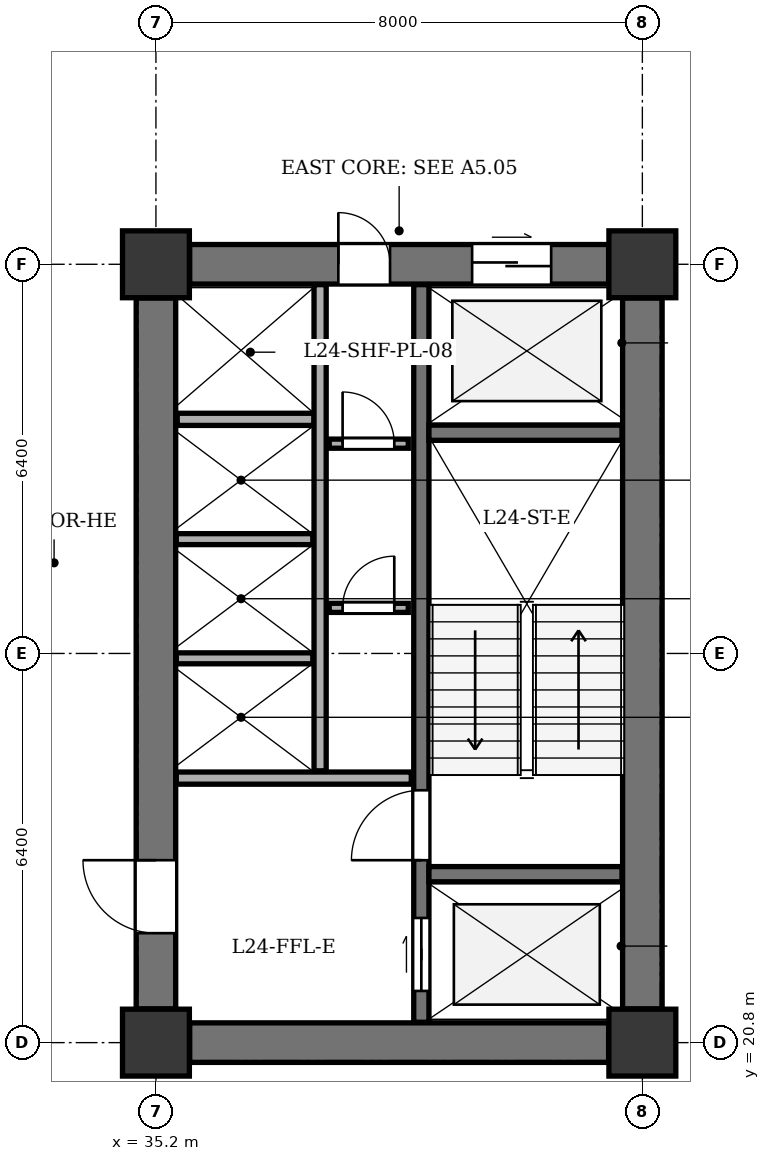
"""IFC4 building model, lengths in metres.
Left out: names, types, materials, properties, quantities, classifications, styles, units other than length and angle.
Written with IfcOpenShell. Run it as: python <this file> out.ifc"""

import sys

from ifc_helpers import new_model, si_unit, direction, frame, frame_2d, origin, origin_2d, place, context, subcontext, project, spatial, rectangle, extrude, element, fill, save


model = new_model("IFC4")
c1 = context("Model", 3, precision=1e-05, world=origin(), true_north=direction((0.0, 1.0)))
c2 = subcontext(c1, "Body", "Model", "MODEL_VIEW")
j1 = project(units=[si_unit("LENGTHUNIT", "METRE"), si_unit("PLANEANGLEUNIT", "RADIAN")], contexts=[c1])
p1 = place(None, origin())
s1 = spatial("IfcSite", under=j1, at=p1, CompositionType="ELEMENT")
p2 = place(p1, origin())
s2 = spatial("IfcBuilding", under=s1, at=p2, CompositionType="ELEMENT")
p3 = place(p2, frame((0.0, 0.0, 98.4)))
s3 = spatial("IfcBuildingStorey", under=s2, at=p3, CompositionType="ELEMENT", Elevation=98.4)
for number, where, z_axis, x_axis in (
    (1, (35.2, 20.8, 0.0), (0.0, 0.0, 1.0), (1.0, 0.0, 0.0)),
    (2, (43.2, 20.8, 0.0), (0.0, 0.0, 1.0), (1.0, 0.0, 0.0)),
    (3, (35.2, 33.6, 0.0), (0.0, 0.0, 1.0), (1.0, 0.0, 0.0)),
    (4, (43.2, 33.6, 0.0), (0.0, 0.0, 1.0), (1.0, 0.0, 0.0)),
):
    element("IfcColumn", number, at=place(p3, frame(where, z_axis=z_axis, x_axis=x_axis)), inside=s3, PredefinedType="COLUMN", context=c2, shape_type="SweptSolid", body=[
        extrude(rectangle(XDim=1.1, YDim=1.1, at=origin_2d()), origin(), (0.0, 0.0, 1.0), 3.9),
    ])
p4 = place(p3, frame((43.2, 21.355, 0.0), z_axis=(0.0, 0.0, 1.0), x_axis=(0.0, 1.0, 0.0)))
e5 = element("IfcWall", 5, at=p4, inside=s3, PredefinedType="SHEAR", context=c2, shape_type="SweptSolid", body=[
    extrude(rectangle(XDim=11.69, YDim=0.65, at=frame_2d((5.845, 0.0))), origin(), (0.0, 0.0, 1.0), 3.6),
])
p5 = place(p3, frame((35.755, 20.8, 0.0), z_axis=(0.0, 0.0, 1.0), x_axis=(1.0, 0.0, 0.0)))
e6 = element("IfcWall", 6, at=p5, inside=s3, PredefinedType="SHEAR", context=c2, shape_type="SweptSolid", body=[
    extrude(rectangle(XDim=6.89, YDim=0.65, at=frame_2d((3.445, 0.0))), origin(), (0.0, 0.0, 1.0), 3.6),
])
p6 = place(p3, frame((35.755, 33.6, 0.0), z_axis=(0.0, 0.0, 1.0), x_axis=(1.0, 0.0, 0.0)))
e7 = element("IfcWall", 7, at=p6, inside=s3, PredefinedType="SHEAR", context=c2, shape_type="SweptSolid", body=[
    extrude(rectangle(XDim=6.89, YDim=0.65, at=frame_2d((3.445, 0.0))), origin(), (0.0, 0.0, 1.0), 3.6),
])
p7 = place(p6, frame((4.645, 0.0, 0.0)))
e8 = element("IfcOpeningElement", 8, at=p7, cuts=e7, PredefinedType="OPENING", context=c2, shape_type="SweptSolid", body=[
    extrude(rectangle(XDim=1.3, YDim=2.15, at=frame_2d((0.65, 1.075))), frame((0.0, 0.335, 0.0), z_axis=(0.0, -1.0, 0.0), x_axis=(1.0, 0.0, 0.0)), (0.0, 0.0, 1.0), 0.67),
])
p8 = place(p6, frame((2.445, 0.0, 0.0)))
e9 = element("IfcOpeningElement", 9, at=p8, cuts=e7, PredefinedType="OPENING", context=c2, shape_type="SweptSolid", body=[
    extrude(rectangle(XDim=0.85, YDim=2.02, at=frame_2d((0.425, 1.01))), frame((0.0, 0.335, 0.0), z_axis=(0.0, -1.0, 0.0), x_axis=(1.0, 0.0, 0.0)), (0.0, 0.0, 1.0), 0.67),
])
p9 = place(p3, frame((35.2, 21.355, 0.0), z_axis=(0.0, 0.0, 1.0), x_axis=(0.0, 1.0, 0.0)))
e10 = element("IfcWall", 10, at=p9, inside=s3, PredefinedType="SHEAR", context=c2, shape_type="SweptSolid", body=[
    extrude(rectangle(XDim=11.69, YDim=0.65, at=frame_2d((5.845, 0.0))), origin(), (0.0, 0.0, 1.0), 3.6),
])
p10 = place(p9, frame((1.245, 0.0, 0.0)))
e11 = element("IfcOpeningElement", 11, at=p10, cuts=e10, PredefinedType="OPENING", context=c2, shape_type="SweptSolid", body=[
    extrude(rectangle(XDim=1.2, YDim=2.15, at=frame_2d((0.6, 1.075))), frame((0.0, 0.335, 0.0), z_axis=(0.0, -1.0, 0.0), x_axis=(1.0, 0.0, 0.0)), (0.0, 0.0, 1.0), 0.67),
])
p11 = place(p3, frame((39.565, 21.135, 0.0), z_axis=(0.0, 0.0, 1.0), x_axis=(0.0, 1.0, 0.0)))
e12 = element("IfcWall", 12, at=p11, inside=s3, PredefinedType="SHEAR", context=c2, shape_type="SweptSolid", body=[
    extrude(rectangle(XDim=12.13, YDim=0.25, at=frame_2d((6.065, 0.0))), origin(), (0.0, 0.0, 1.0), 3.6),
])
p12 = place(p11, frame((0.515, 0.0, 0.0)))
e13 = element("IfcOpeningElement", 13, at=p12, cuts=e12, PredefinedType="OPENING", context=c2, shape_type="SweptSolid", body=[
    extrude(rectangle(XDim=1.2, YDim=2.15, at=frame_2d((0.6, 1.075))), frame((0.0, 0.135, 0.0), z_axis=(0.0, -1.0, 0.0), x_axis=(1.0, 0.0, 0.0)), (0.0, 0.0, 1.0), 0.27),
])
p13 = place(p11, frame((2.665, 0.0, 0.0)))
e14 = element("IfcOpeningElement", 14, at=p13, cuts=e12, PredefinedType="OPENING", context=c2, shape_type="SweptSolid", body=[
    extrude(rectangle(XDim=1.15, YDim=2.15, at=frame_2d((0.575, 1.075))), frame((0.0, 0.135, 0.0), z_axis=(0.0, -1.0, 0.0), x_axis=(1.0, 0.0, 0.0)), (0.0, 0.0, 1.0), 0.27),
])
for number, where, z_axis, x_axis in (
    (15, (39.69, 23.57, 0.0), (0.0, 0.0, 1.0), (1.0, 0.0, 0.0)),
    (16, (39.69, 30.83, 0.0), (0.0, 0.0, 1.0), (1.0, 0.0, 0.0)),
):
    element("IfcWall", number, at=place(p3, frame(where, z_axis=z_axis, x_axis=x_axis)), inside=s3, PredefinedType="SHEAR", context=c2, shape_type="SweptSolid", body=[
        extrude(rectangle(XDim=3.175, YDim=0.25, at=frame_2d((1.587, 0.0))), origin(), (0.0, 0.0, 1.0), 3.6),
    ])
p14 = place(p3, frame((35.535, 25.15, 0.0), z_axis=(0.0, 0.0, 1.0), x_axis=(1.0, 0.0, 0.0)))
e17 = element("IfcWall", 17, at=p14, inside=s3, PredefinedType="SOLIDWALL", context=c2, shape_type="SweptSolid", body=[
    extrude(rectangle(XDim=3.865, YDim=0.2, at=frame_2d((1.933, 0.0))), origin(), (0.0, 0.0, 1.0), 3.6),
])
p15 = place(p3, frame((35.55, 31.05, 0.0), z_axis=(0.0, 0.0, 1.0), x_axis=(1.0, 0.0, 0.0)))
e18 = element("IfcWall", 18, at=p15, inside=s3, PredefinedType="SOLIDWALL", context=c2, shape_type="SweptSolid", body=[
    extrude(rectangle(XDim=2.25, YDim=0.2, at=frame_2d((1.125, 0.0))), origin(), (0.0, 0.0, 1.0), 3.6),
])
p16 = place(p3, frame((37.9, 25.27, 0.0), z_axis=(0.0, 0.0, 1.0), x_axis=(0.0, 1.0, 0.0)))
e19 = element("IfcWall", 19, at=p16, inside=s3, PredefinedType="SOLIDWALL", context=c2, shape_type="SweptSolid", body=[
    extrude(rectangle(XDim=7.995, YDim=0.2, at=frame_2d((3.998, 0.0))), origin(), (0.0, 0.0, 1.0), 3.6),
])
for number, where, z_axis, x_axis in (
    (20, (35.535, 27.12, 0.0), (0.0, 0.0, 1.0), (1.0, 0.0, 0.0)),
    (21, (35.535, 29.08, 0.0), (0.0, 0.0, 1.0), (1.0, 0.0, 0.0)),
):
    element("IfcWall", number, at=place(p3, frame(where, z_axis=z_axis, x_axis=x_axis)), inside=s3, PredefinedType="PARTITIONING", context=c2, shape_type="SweptSolid", body=[
        extrude(rectangle(XDim=2.245, YDim=0.18, at=frame_2d((1.123, 0.0))), origin(), (0.0, 0.0, 1.0), 3.6),
    ])
p17 = place(p3, frame((38.05, 27.95, 0.0), z_axis=(0.0, 0.0, 1.0), x_axis=(1.0, 0.0, 0.0)))
e22 = element("IfcWall", 22, at=p17, inside=s3, PredefinedType="PARTITIONING", context=c2, shape_type="SweptSolid", body=[
    extrude(rectangle(XDim=1.3, YDim=0.15, at=frame_2d((0.65, 0.0))), origin(), (0.0, 0.0, 1.0), 3.6),
])
p18 = place(p17, frame((0.22, 0.0, 0.0)))
e23 = element("IfcOpeningElement", 23, at=p18, cuts=e22, PredefinedType="OPENING", context=c2, shape_type="SweptSolid", body=[
    extrude(rectangle(XDim=0.85, YDim=2.02, at=frame_2d((0.425, 1.01))), frame((0.0, 0.085, 0.0), z_axis=(0.0, -1.0, 0.0), x_axis=(1.0, 0.0, 0.0)), (0.0, 0.0, 1.0), 0.17),
])
p19 = place(p3, frame((38.05, 30.65, 0.0), z_axis=(0.0, 0.0, 1.0), x_axis=(1.0, 0.0, 0.0)))
e24 = element("IfcWall", 24, at=p19, inside=s3, PredefinedType="PARTITIONING", context=c2, shape_type="SweptSolid", body=[
    extrude(rectangle(XDim=1.3, YDim=0.15, at=frame_2d((0.65, 0.0))), origin(), (0.0, 0.0, 1.0), 3.6),
])
p20 = place(p19, frame((0.22, 0.0, 0.0)))
e25 = element("IfcOpeningElement", 25, at=p20, cuts=e24, PredefinedType="OPENING", context=c2, shape_type="SweptSolid", body=[
    extrude(rectangle(XDim=0.85, YDim=2.02, at=frame_2d((0.425, 1.01))), frame((0.0, 0.085, 0.0), z_axis=(0.0, -1.0, 0.0), x_axis=(1.0, 0.0, 0.0)), (0.0, 0.0, 1.0), 0.17),
])
p21 = place(p7, origin())
e26 = element("IfcDoor", 26, at=p21, inside=s3, OperationType="DOUBLE_DOOR_SLIDING", PredefinedType="DOOR", context=c2, shape_type="SweptSolid", body=[
    extrude(rectangle(XDim=1.3, YDim=2.15, at=frame_2d((0.65, 1.075))), frame((0.0, 0.025, 0.0), z_axis=(0.0, -1.0, 0.0), x_axis=(1.0, 0.0, 0.0)), (0.0, 0.0, 1.0), 0.05),
])
fill(e8, e26)
p22 = place(p8, origin())
e27 = element("IfcDoor", 27, at=p22, inside=s3, OperationType="SINGLE_SWING_LEFT", PredefinedType="DOOR", context=c2, shape_type="SweptSolid", body=[
    extrude(rectangle(XDim=0.85, YDim=2.02, at=frame_2d((0.425, 1.01))), frame((0.0, 0.025, 0.0), z_axis=(0.0, -1.0, 0.0), x_axis=(1.0, 0.0, 0.0)), (0.0, 0.0, 1.0), 0.05),
])
fill(e9, e27)
p23 = place(p10, origin())
e28 = element("IfcDoor", 28, at=p23, inside=s3, OperationType="SINGLE_SWING_RIGHT", PredefinedType="DOOR", context=c2, shape_type="SweptSolid", body=[
    extrude(rectangle(XDim=1.2, YDim=2.15, at=frame_2d((0.6, 1.075))), frame((0.0, 0.025, 0.0), z_axis=(0.0, -1.0, 0.0), x_axis=(1.0, 0.0, 0.0)), (0.0, 0.0, 1.0), 0.05),
])
fill(e11, e28)
p24 = place(p12, origin())
e29 = element("IfcDoor", 29, at=p24, inside=s3, OperationType="DOUBLE_DOOR_SLIDING", PredefinedType="DOOR", context=c2, shape_type="SweptSolid", body=[
    extrude(rectangle(XDim=1.2, YDim=2.15, at=frame_2d((0.6, 1.075))), frame((0.0, 0.025, 0.0), z_axis=(0.0, -1.0, 0.0), x_axis=(1.0, 0.0, 0.0)), (0.0, 0.0, 1.0), 0.05),
])
fill(e13, e29)
p25 = place(p13, origin())
e30 = element("IfcDoor", 30, at=p25, inside=s3, OperationType="SINGLE_SWING_LEFT", PredefinedType="DOOR", context=c2, shape_type="SweptSolid", body=[
    extrude(rectangle(XDim=1.15, YDim=2.15, at=frame_2d((0.575, 1.075))), frame((0.0, 0.025, 0.0), z_axis=(0.0, -1.0, 0.0), x_axis=(1.0, 0.0, 0.0)), (0.0, 0.0, 1.0), 0.05),
])
fill(e14, e30)
p26 = place(p18, origin())
e31 = element("IfcDoor", 31, at=p26, inside=s3, OperationType="SINGLE_SWING_RIGHT", PredefinedType="DOOR", context=c2, shape_type="SweptSolid", body=[
    extrude(rectangle(XDim=0.85, YDim=2.02, at=frame_2d((0.425, 1.01))), frame((0.0, 0.025, 0.0), z_axis=(0.0, -1.0, 0.0), x_axis=(1.0, 0.0, 0.0)), (0.0, 0.0, 1.0), 0.05),
])
fill(e23, e31)
p27 = place(p20, origin())
e32 = element("IfcDoor", 32, at=p27, inside=s3, OperationType="SINGLE_SWING_LEFT", PredefinedType="DOOR", context=c2, shape_type="SweptSolid", body=[
    extrude(rectangle(XDim=0.85, YDim=2.02, at=frame_2d((0.425, 1.01))), frame((0.0, 0.025, 0.0), z_axis=(0.0, -1.0, 0.0), x_axis=(1.0, 0.0, 0.0)), (0.0, 0.0, 1.0), 0.05),
])
fill(e25, e32)
save(model, sys.argv[1])
